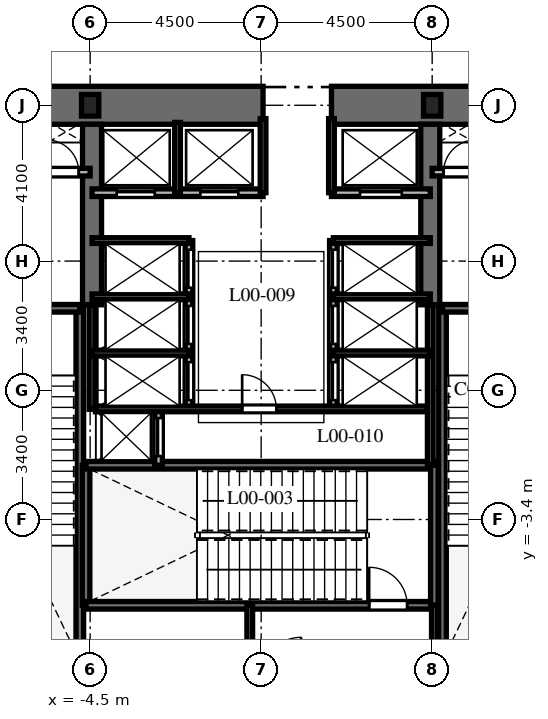
"""IFC4 building model, lengths in metres.
Left out: names, types, materials, properties, quantities, classifications, styles, units other than length and angle.
Written with IfcOpenShell. Run it as: python <this file> out.ifc"""

import sys

from ifc_helpers import new_model, si_unit, direction, frame, frame_2d, origin, origin_2d, place, context, subcontext, project, spatial, rectangle, i_section, extrude, element, fill, save


model = new_model("IFC4")
c1 = context("Model", 3, precision=1e-05, world=origin(), true_north=direction((0.0, 1.0)))
c2 = subcontext(c1, "Body", "Model", "MODEL_VIEW")
j1 = project(units=[si_unit("LENGTHUNIT", "METRE"), si_unit("PLANEANGLEUNIT", "RADIAN")], contexts=[c1])
p1 = place(None, origin())
s1 = spatial("IfcSite", under=j1, at=p1, CompositionType="ELEMENT")
p2 = place(p1, origin())
s2 = spatial("IfcBuilding", under=s1, at=p2, CompositionType="ELEMENT")
p3 = place(p2, origin())
s3 = spatial("IfcBuildingStorey", under=s2, at=p3, CompositionType="ELEMENT", Elevation=0.0)
p4 = place(p3, frame((-9.5, 7.5, 0.0), z_axis=(0.0, 0.0, 1.0), x_axis=(1.0, 0.0, 0.0)))
e1 = element("IfcWall", 1, at=p4, inside=s3, PredefinedType="SHEAR", context=c2, shape_type="SweptSolid", body=[
    extrude(rectangle(XDim=9.55, YDim=1.0, at=frame_2d((4.775, 0.0))), origin(), (0.0, 0.0, 1.0), 6.0),
])
p5 = place(p3, frame((1.85, 7.5, 0.0), z_axis=(0.0, 0.0, 1.0), x_axis=(1.0, 0.0, 0.0)))
e2 = element("IfcWall", 2, at=p5, inside=s3, PredefinedType="SHEAR", context=c2, shape_type="SweptSolid", body=[
    extrude(rectangle(XDim=7.65, YDim=1.0, at=frame_2d((3.825, 0.0))), origin(), (0.0, 0.0, 1.0), 6.0),
])
for number, where, z_axis, x_axis in (
    (3, (-4.45, 2.25, 0.0), (0.0, 0.0, 1.0), (0.0, 1.0, 0.0)),
    (4, (4.45, 2.25, 0.0), (0.0, 0.0, 1.0), (0.0, 1.0, 0.0)),
):
    element("IfcWall", number, at=place(p3, frame(where, z_axis=z_axis, x_axis=x_axis)), inside=s3, PredefinedType="SHEAR", context=c2, shape_type="SweptSolid", body=[
        extrude(rectangle(XDim=4.75, YDim=0.5, at=frame_2d((2.375, 0.0))), origin(), (0.0, 0.0, 1.0), 6.0),
    ])
p6 = place(p3, frame((-4.772, -6.985, 0.0), z_axis=(0.0, 0.0, 1.0), x_axis=(0.0, 1.0, 0.0)))
e5 = element("IfcWall", 5, at=p6, inside=s3, PredefinedType="SHEAR", context=c2, shape_type="SweptSolid", body=[
    extrude(rectangle(XDim=9.143, YDim=0.2, at=frame_2d((4.572, 0.0))), origin(), (0.0, 0.0, 1.0), 6.0),
])
p7 = place(p3, frame((-8.458, 2.158, 0.0), z_axis=(0.0, 0.0, 1.0), x_axis=(1.0, 0.0, 0.0)))
e6 = element("IfcWall", 6, at=p7, inside=s3, PredefinedType="SHEAR", context=c2, shape_type="SweptSolid", body=[
    extrude(rectangle(XDim=3.686, YDim=0.2, at=frame_2d((1.843, 0.0))), origin(), (0.0, 0.0, 1.0), 6.0),
])
p8 = place(p7, frame((1.3, 0.0, 0.0)))
e7 = element("IfcOpeningElement", 7, at=p8, cuts=e6, PredefinedType="OPENING", context=c2, shape_type="SweptSolid", body=[
    extrude(rectangle(XDim=1.0, YDim=2.15, at=frame_2d((0.5, 1.075))), frame((0.0, 0.11, 0.0), z_axis=(0.0, -1.0, 0.0), x_axis=(1.0, 0.0, 0.0)), (0.0, 0.0, 1.0), 0.22),
])
p9 = place(p3, frame((4.772, -6.985, 0.0), z_axis=(0.0, 0.0, 1.0), x_axis=(0.0, 1.0, 0.0)))
e8 = element("IfcWall", 8, at=p9, inside=s3, PredefinedType="SHEAR", context=c2, shape_type="SweptSolid", body=[
    extrude(rectangle(XDim=9.143, YDim=0.2, at=frame_2d((4.572, 0.0))), origin(), (0.0, 0.0, 1.0), 6.0),
])
p10 = place(p3, frame((4.772, 2.158, 0.0), z_axis=(0.0, 0.0, 1.0), x_axis=(1.0, 0.0, 0.0)))
e9 = element("IfcWall", 9, at=p10, inside=s3, PredefinedType="SHEAR", context=c2, shape_type="SweptSolid", body=[
    extrude(rectangle(XDim=3.686, YDim=0.2, at=frame_2d((1.843, 0.0))), origin(), (0.0, 0.0, 1.0), 6.0),
])
p11 = place(p10, frame((1.35, 0.0, 0.0)))
e10 = element("IfcOpeningElement", 10, at=p11, cuts=e9, PredefinedType="OPENING", context=c2, shape_type="SweptSolid", body=[
    extrude(rectangle(XDim=1.0, YDim=2.15, at=frame_2d((0.5, 1.075))), frame((0.0, 0.11, 0.0), z_axis=(0.0, -1.0, 0.0), x_axis=(1.0, 0.0, 0.0)), (0.0, 0.0, 1.0), 0.22),
])
p12 = place(p3, frame((-4.608, -5.658, 0.0), z_axis=(0.0, 0.0, 1.0), x_axis=(0.0, 1.0, 0.0)))
e11 = element("IfcWall", 11, at=p12, inside=s3, PredefinedType="SHEAR", context=c2, shape_type="SweptSolid", body=[
    extrude(rectangle(XDim=3.686, YDim=0.2, at=frame_2d((1.843, 0.0))), origin(), (0.0, 0.0, 1.0), 6.0),
])
p13 = place(p3, frame((-4.608, -5.658, 0.0), z_axis=(0.0, 0.0, 1.0), x_axis=(1.0, 0.0, 0.0)))
e12 = element("IfcWall", 12, at=p13, inside=s3, PredefinedType="SHEAR", context=c2, shape_type="SweptSolid", body=[
    extrude(rectangle(XDim=9.166, YDim=0.2, at=frame_2d((4.583, 0.0))), origin(), (0.0, 0.0, 1.0), 6.0),
])
p14 = place(p13, frame((7.45, 0.0, 0.0)))
e13 = element("IfcOpeningElement", 13, at=p14, cuts=e12, PredefinedType="OPENING", context=c2, shape_type="SweptSolid", body=[
    extrude(rectangle(XDim=1.0, YDim=2.15, at=frame_2d((0.5, 1.075))), frame((0.0, 0.11, 0.0), z_axis=(0.0, -1.0, 0.0), x_axis=(1.0, 0.0, 0.0)), (0.0, 0.0, 1.0), 0.22),
])
p15 = place(p3, frame((-4.608, -1.972, 0.0), z_axis=(0.0, 0.0, 1.0), x_axis=(1.0, 0.0, 0.0)))
e14 = element("IfcWall", 14, at=p15, inside=s3, PredefinedType="SHEAR", context=c2, shape_type="SweptSolid", body=[
    extrude(rectangle(XDim=9.166, YDim=0.2, at=frame_2d((4.583, 0.0))), origin(), (0.0, 0.0, 1.0), 6.0),
])
p16 = place(p3, frame((4.558, -5.658, 0.0), z_axis=(0.0, 0.0, 1.0), x_axis=(0.0, 1.0, 0.0)))
e15 = element("IfcWall", 15, at=p16, inside=s3, PredefinedType="SHEAR", context=c2, shape_type="SweptSolid", body=[
    extrude(rectangle(XDim=3.686, YDim=0.2, at=frame_2d((1.843, 0.0))), origin(), (0.0, 0.0, 1.0), 6.0),
])
for number, where, z_axis, x_axis in (
    (16, (4.5, 7.5, 0.0), (0.0, 0.0, 1.0), (1.0, 0.0, 0.0)),
    (17, (-4.5, 7.5, 0.0), (0.0, 0.0, 1.0), (1.0, 0.0, 0.0)),
):
    element("IfcColumn", number, at=place(p3, frame(where, z_axis=z_axis, x_axis=x_axis)), inside=s3, PredefinedType="COLUMN", context=c2, shape_type="SweptSolid", body=[
        extrude(i_section(OverallWidth=0.454, OverallDepth=0.569, WebThickness=0.078, FlangeThickness=0.125, at=origin_2d()), origin(), (0.0, 0.0, 1.0), 6.0),
    ])
for number, where, z_axis, x_axis in (
    (18, (-0.3, -7.02, 0.0), (0.0, 0.0, 1.0), (0.0, 1.0, 0.0)),
    (19, (4.558, -7.02, 0.0), (0.0, 0.0, 1.0), (0.0, 1.0, 0.0)),
):
    element("IfcWall", number, at=place(p3, frame(where, z_axis=z_axis, x_axis=x_axis)), inside=s3, PredefinedType="PARTITIONING", context=c2, shape_type="SweptSolid", body=[
        extrude(rectangle(XDim=1.362, YDim=0.15, at=frame_2d((0.681, 0.0))), origin(), (0.0, 0.0, 1.0), 5.68),
    ])
p17 = place(p3, frame((-8.55, 5.74, 0.0), z_axis=(0.0, 0.0, 1.0), x_axis=(1.0, 0.0, 0.0)))
e20 = element("IfcWall", 20, at=p17, inside=s3, PredefinedType="PARTITIONING", context=c2, shape_type="SweptSolid", body=[
    extrude(rectangle(XDim=4.05, YDim=0.2, at=frame_2d((2.025, 0.0))), origin(), (0.0, 0.0, 1.0), 5.68),
])
p18 = place(p17, frame((0.75, 0.0, 0.0)))
e21 = element("IfcOpeningElement", 21, at=p18, cuts=e20, PredefinedType="OPENING", context=c2, shape_type="SweptSolid", body=[
    extrude(rectangle(XDim=1.1, YDim=2.2, at=frame_2d((0.55, 1.1))), frame((0.0, 0.11, 0.0), z_axis=(0.0, -1.0, 0.0), x_axis=(1.0, 0.0, 0.0)), (0.0, 0.0, 1.0), 0.22),
])
p19 = place(p17, frame((2.9, 0.0, 0.0)))
e22 = element("IfcOpeningElement", 22, at=p19, cuts=e20, PredefinedType="OPENING", context=c2, shape_type="SweptSolid", body=[
    extrude(rectangle(XDim=0.85, YDim=2.03, at=frame_2d((0.425, 1.015))), frame((0.0, 0.11, 0.0), z_axis=(0.0, -1.0, 0.0), x_axis=(1.0, 0.0, 0.0)), (0.0, 0.0, 1.0), 0.22),
])
p20 = place(p3, frame((4.5, 5.74, 0.0), z_axis=(0.0, 0.0, 1.0), x_axis=(1.0, 0.0, 0.0)))
e23 = element("IfcWall", 23, at=p20, inside=s3, PredefinedType="PARTITIONING", context=c2, shape_type="SweptSolid", body=[
    extrude(rectangle(XDim=4.05, YDim=0.2, at=frame_2d((2.025, 0.0))), origin(), (0.0, 0.0, 1.0), 5.68),
])
p21 = place(p20, frame((0.3, 0.0, 0.0)))
e24 = element("IfcOpeningElement", 24, at=p21, cuts=e23, PredefinedType="OPENING", context=c2, shape_type="SweptSolid", body=[
    extrude(rectangle(XDim=0.85, YDim=2.03, at=frame_2d((0.425, 1.015))), frame((0.0, 0.11, 0.0), z_axis=(0.0, -1.0, 0.0), x_axis=(1.0, 0.0, 0.0)), (0.0, 0.0, 1.0), 0.22),
])
p22 = place(p20, frame((2.15, 0.0, 0.0)))
e25 = element("IfcOpeningElement", 25, at=p22, cuts=e23, PredefinedType="OPENING", context=c2, shape_type="SweptSolid", body=[
    extrude(rectangle(XDim=1.1, YDim=2.2, at=frame_2d((0.55, 1.1))), frame((0.0, 0.11, 0.0), z_axis=(0.0, -1.0, 0.0), x_axis=(1.0, 0.0, 0.0)), (0.0, 0.0, 1.0), 0.22),
])
p23 = place(p3, frame((-2.7, -1.972, 0.0), z_axis=(0.0, 0.0, 1.0), x_axis=(0.0, 1.0, 0.0)))
e26 = element("IfcWall", 26, at=p23, inside=s3, PredefinedType="PARTITIONING", context=c2, shape_type="SweptSolid", body=[
    extrude(rectangle(XDim=1.472, YDim=0.2, at=frame_2d((0.736, 0.0))), origin(), (0.0, 0.0, 1.0), 5.68),
])
p24 = place(p23, frame((0.24, 0.0, 0.0)))
e27 = element("IfcOpeningElement", 27, at=p24, cuts=e26, PredefinedType="OPENING", context=c2, shape_type="SweptSolid", body=[
    extrude(rectangle(XDim=1.0, YDim=2.2, at=frame_2d((0.5, 1.1))), frame((0.0, 0.11, 0.0), z_axis=(0.0, -1.0, 0.0), x_axis=(1.0, 0.0, 0.0)), (0.0, 0.0, 1.0), 0.22),
])
p25 = place(p3, frame((-4.45, 5.2, 0.0), z_axis=(0.0, 0.0, 1.0), x_axis=(1.0, 0.0, 0.0)))
e28 = element("IfcWall", 28, at=p25, inside=s3, PredefinedType="PARTITIONING", context=c2, shape_type="SweptSolid", body=[
    extrude(rectangle(XDim=4.5, YDim=0.2, at=frame_2d((2.25, 0.0))), origin(), (0.0, 0.0, 1.0), 5.68),
])
p26 = place(p25, frame((0.65, 0.0, 0.0)))
e29 = element("IfcOpeningElement", 29, at=p26, cuts=e28, PredefinedType="OPENING", context=c2, shape_type="SweptSolid", body=[
    extrude(rectangle(XDim=1.0, YDim=2.2, at=frame_2d((0.5, 1.1))), frame((0.0, 0.11, 0.0), z_axis=(0.0, -1.0, 0.0), x_axis=(1.0, 0.0, 0.0)), (0.0, 0.0, 1.0), 0.22),
])
p27 = place(p25, frame((2.85, 0.0, 0.0)))
e30 = element("IfcOpeningElement", 30, at=p27, cuts=e28, PredefinedType="OPENING", context=c2, shape_type="SweptSolid", body=[
    extrude(rectangle(XDim=1.0, YDim=2.2, at=frame_2d((0.5, 1.1))), frame((0.0, 0.11, 0.0), z_axis=(0.0, -1.0, 0.0), x_axis=(1.0, 0.0, 0.0)), (0.0, 0.0, 1.0), 0.22),
])
p28 = place(p3, frame((1.85, 5.2, 0.0), z_axis=(0.0, 0.0, 1.0), x_axis=(1.0, 0.0, 0.0)))
e31 = element("IfcWall", 31, at=p28, inside=s3, PredefinedType="PARTITIONING", context=c2, shape_type="SweptSolid", body=[
    extrude(rectangle(XDim=2.6, YDim=0.2, at=frame_2d((1.3, 0.0))), origin(), (0.0, 0.0, 1.0), 5.68),
])
p29 = place(p28, frame((0.75, 0.0, 0.0)))
e32 = element("IfcOpeningElement", 32, at=p29, cuts=e31, PredefinedType="OPENING", context=c2, shape_type="SweptSolid", body=[
    extrude(rectangle(XDim=1.1, YDim=2.2, at=frame_2d((0.55, 1.1))), frame((0.0, 0.11, 0.0), z_axis=(0.0, -1.0, 0.0), x_axis=(1.0, 0.0, 0.0)), (0.0, 0.0, 1.0), 0.22),
])
p30 = place(p3, frame((-2.2, 5.2, 0.0), z_axis=(0.0, 0.0, 1.0), x_axis=(0.0, 1.0, 0.0)))
e33 = element("IfcWall", 33, at=p30, inside=s3, PredefinedType="PARTITIONING", context=c2, shape_type="SweptSolid", body=[
    extrude(rectangle(XDim=1.85, YDim=0.15, at=frame_2d((0.925, 0.0))), origin(), (0.0, 0.0, 1.0), 5.68),
])
for number, where, z_axis, x_axis in (
    (34, (0.05, 5.2, 0.0), (0.0, 0.0, 1.0), (0.0, 1.0, 0.0)),
    (35, (1.85, 5.2, 0.0), (0.0, 0.0, 1.0), (0.0, 1.0, 0.0)),
):
    element("IfcWall", number, at=place(p3, frame(where, z_axis=z_axis, x_axis=x_axis)), inside=s3, PredefinedType="PARTITIONING", context=c2, shape_type="SweptSolid", body=[
        extrude(rectangle(XDim=1.95, YDim=0.15, at=frame_2d((0.975, 0.0))), origin(), (0.0, 0.0, 1.0), 5.68),
    ])
p31 = place(p3, frame((-4.45, -0.5, 0.0), z_axis=(0.0, 0.0, 1.0), x_axis=(0.0, 1.0, 0.0)))
e36 = element("IfcWall", 36, at=p31, inside=s3, PredefinedType="PARTITIONING", context=c2, shape_type="SweptSolid", body=[
    extrude(rectangle(XDim=2.75, YDim=0.15, at=frame_2d((1.375, 0.0))), origin(), (0.0, 0.0, 1.0), 5.68),
])
p32 = place(p3, frame((4.45, -1.972, 0.0), z_axis=(0.0, 0.0, 1.0), x_axis=(0.0, 1.0, 0.0)))
e37 = element("IfcWall", 37, at=p32, inside=s3, PredefinedType="PARTITIONING", context=c2, shape_type="SweptSolid", body=[
    extrude(rectangle(XDim=4.222, YDim=0.15, at=frame_2d((2.111, 0.0))), origin(), (0.0, 0.0, 1.0), 5.68),
])
p33 = place(p3, frame((-1.9, -0.5, 0.0), z_axis=(0.0, 0.0, 1.0), x_axis=(0.0, 1.0, 0.0)))
e38 = element("IfcWall", 38, at=p33, inside=s3, PredefinedType="PARTITIONING", context=c2, shape_type="SweptSolid", body=[
    extrude(rectangle(XDim=4.44, YDim=0.2, at=frame_2d((2.22, 0.0))), origin(), (0.0, 0.0, 1.0), 5.68),
])
p34 = place(p33, frame((0.24, 0.0, 0.0)))
e39 = element("IfcOpeningElement", 39, at=p34, cuts=e38, PredefinedType="OPENING", context=c2, shape_type="SweptSolid", body=[
    extrude(rectangle(XDim=1.0, YDim=2.2, at=frame_2d((0.5, 1.1))), frame((0.0, 0.11, 0.0), z_axis=(0.0, -1.0, 0.0), x_axis=(1.0, 0.0, 0.0)), (0.0, 0.0, 1.0), 0.22),
])
p35 = place(p33, frame((1.72, 0.0, 0.0)))
e40 = element("IfcOpeningElement", 40, at=p35, cuts=e38, PredefinedType="OPENING", context=c2, shape_type="SweptSolid", body=[
    extrude(rectangle(XDim=1.0, YDim=2.2, at=frame_2d((0.5, 1.1))), frame((0.0, 0.11, 0.0), z_axis=(0.0, -1.0, 0.0), x_axis=(1.0, 0.0, 0.0)), (0.0, 0.0, 1.0), 0.22),
])
p36 = place(p33, frame((3.2, 0.0, 0.0)))
e41 = element("IfcOpeningElement", 41, at=p36, cuts=e38, PredefinedType="OPENING", context=c2, shape_type="SweptSolid", body=[
    extrude(rectangle(XDim=1.0, YDim=2.2, at=frame_2d((0.5, 1.1))), frame((0.0, 0.11, 0.0), z_axis=(0.0, -1.0, 0.0), x_axis=(1.0, 0.0, 0.0)), (0.0, 0.0, 1.0), 0.22),
])
for number, where, z_axis, x_axis in (
    (42, (-4.45, 3.94, 0.0), (0.0, 0.0, 1.0), (1.0, 0.0, 0.0)),
    (43, (-4.45, 0.98, 0.0), (0.0, 0.0, 1.0), (1.0, 0.0, 0.0)),
    (44, (-4.45, 2.46, 0.0), (0.0, 0.0, 1.0), (1.0, 0.0, 0.0)),
):
    element("IfcWall", number, at=place(p3, frame(where, z_axis=z_axis, x_axis=x_axis)), inside=s3, PredefinedType="PARTITIONING", context=c2, shape_type="SweptSolid", body=[
        extrude(rectangle(XDim=2.55, YDim=0.15, at=frame_2d((1.275, 0.0))), origin(), (0.0, 0.0, 1.0), 5.68),
    ])
p37 = place(p3, frame((1.9, -0.5, 0.0), z_axis=(0.0, 0.0, 1.0), x_axis=(0.0, 1.0, 0.0)))
e45 = element("IfcWall", 45, at=p37, inside=s3, PredefinedType="PARTITIONING", context=c2, shape_type="SweptSolid", body=[
    extrude(rectangle(XDim=4.44, YDim=0.2, at=frame_2d((2.22, 0.0))), origin(), (0.0, 0.0, 1.0), 5.68),
])
p38 = place(p37, frame((0.24, 0.0, 0.0)))
e46 = element("IfcOpeningElement", 46, at=p38, cuts=e45, PredefinedType="OPENING", context=c2, shape_type="SweptSolid", body=[
    extrude(rectangle(XDim=1.0, YDim=2.2, at=frame_2d((0.5, 1.1))), frame((0.0, 0.11, 0.0), z_axis=(0.0, -1.0, 0.0), x_axis=(1.0, 0.0, 0.0)), (0.0, 0.0, 1.0), 0.22),
])
p39 = place(p37, frame((1.72, 0.0, 0.0)))
e47 = element("IfcOpeningElement", 47, at=p39, cuts=e45, PredefinedType="OPENING", context=c2, shape_type="SweptSolid", body=[
    extrude(rectangle(XDim=1.0, YDim=2.2, at=frame_2d((0.5, 1.1))), frame((0.0, 0.11, 0.0), z_axis=(0.0, -1.0, 0.0), x_axis=(1.0, 0.0, 0.0)), (0.0, 0.0, 1.0), 0.22),
])
p40 = place(p37, frame((3.2, 0.0, 0.0)))
e48 = element("IfcOpeningElement", 48, at=p40, cuts=e45, PredefinedType="OPENING", context=c2, shape_type="SweptSolid", body=[
    extrude(rectangle(XDim=1.0, YDim=2.2, at=frame_2d((0.5, 1.1))), frame((0.0, 0.11, 0.0), z_axis=(0.0, -1.0, 0.0), x_axis=(1.0, 0.0, 0.0)), (0.0, 0.0, 1.0), 0.22),
])
for number, where, z_axis, x_axis in (
    (49, (1.9, 3.94, 0.0), (0.0, 0.0, 1.0), (1.0, 0.0, 0.0)),
    (50, (1.9, 0.98, 0.0), (0.0, 0.0, 1.0), (1.0, 0.0, 0.0)),
    (51, (1.9, 2.46, 0.0), (0.0, 0.0, 1.0), (1.0, 0.0, 0.0)),
):
    element("IfcWall", number, at=place(p3, frame(where, z_axis=z_axis, x_axis=x_axis)), inside=s3, PredefinedType="PARTITIONING", context=c2, shape_type="SweptSolid", body=[
        extrude(rectangle(XDim=2.55, YDim=0.15, at=frame_2d((1.275, 0.0))), origin(), (0.0, 0.0, 1.0), 5.68),
    ])
p41 = place(p3, frame((-4.36, -0.49, 0.0), z_axis=(0.0, 0.0, 1.0), x_axis=(1.0, 0.0, 0.0)))
e52 = element("IfcWall", 52, at=p41, inside=s3, PredefinedType="PARTITIONING", context=c2, shape_type="SweptSolid", body=[
    extrude(rectangle(XDim=8.72, YDim=0.15, at=frame_2d((4.36, 0.0))), origin(), (0.0, 0.0, 1.0), 5.68),
])
p42 = place(p41, frame((3.86, 0.0, 0.0)))
e53 = element("IfcOpeningElement", 53, at=p42, cuts=e52, PredefinedType="OPENING", context=c2, shape_type="SweptSolid", body=[
    extrude(rectangle(XDim=0.9, YDim=2.03, at=frame_2d((0.45, 1.015))), frame((0.0, 0.085, 0.0), z_axis=(0.0, -1.0, 0.0), x_axis=(1.0, 0.0, 0.0)), (0.0, 0.0, 1.0), 0.17),
])
p43 = place(p14, origin())
e54 = element("IfcDoor", 54, at=p43, inside=s3, OperationType="SINGLE_SWING_LEFT", PredefinedType="DOOR", context=c2, shape_type="SweptSolid", body=[
    extrude(rectangle(XDim=1.0, YDim=2.15, at=frame_2d((0.5, 1.075))), frame((0.0, 0.025, 0.0), z_axis=(0.0, -1.0, 0.0), x_axis=(1.0, 0.0, 0.0)), (0.0, 0.0, 1.0), 0.05),
])
fill(e13, e54)
p44 = place(p19, origin())
e55 = element("IfcDoor", 55, at=p44, inside=s3, OperationType="SINGLE_SWING_LEFT", PredefinedType="DOOR", context=c2, shape_type="SweptSolid", body=[
    extrude(rectangle(XDim=0.85, YDim=2.03, at=frame_2d((0.425, 1.015))), frame((0.0, 0.025, 0.0), z_axis=(0.0, -1.0, 0.0), x_axis=(1.0, 0.0, 0.0)), (0.0, 0.0, 1.0), 0.05),
])
fill(e22, e55)
p45 = place(p21, origin())
e56 = element("IfcDoor", 56, at=p45, inside=s3, OperationType="SINGLE_SWING_RIGHT", PredefinedType="DOOR", context=c2, shape_type="SweptSolid", body=[
    extrude(rectangle(XDim=0.85, YDim=2.03, at=frame_2d((0.425, 1.015))), frame((0.0, 0.025, 0.0), z_axis=(0.0, -1.0, 0.0), x_axis=(1.0, 0.0, 0.0)), (0.0, 0.0, 1.0), 0.05),
])
fill(e24, e56)
p46 = place(p24, origin())
e57 = element("IfcDoor", 57, at=p46, inside=s3, OperationType="SLIDING_TO_LEFT", PredefinedType="DOOR", context=c2, shape_type="SweptSolid", body=[
    extrude(rectangle(XDim=1.0, YDim=2.2, at=frame_2d((0.5, 1.1))), frame((0.0, 0.025, 0.0), z_axis=(0.0, -1.0, 0.0), x_axis=(1.0, 0.0, 0.0)), (0.0, 0.0, 1.0), 0.05),
])
fill(e27, e57)
p47 = place(p26, origin())
e58 = element("IfcDoor", 58, at=p47, inside=s3, OperationType="SLIDING_TO_LEFT", PredefinedType="DOOR", context=c2, shape_type="SweptSolid", body=[
    extrude(rectangle(XDim=1.0, YDim=2.2, at=frame_2d((0.5, 1.1))), frame((0.0, 0.025, 0.0), z_axis=(0.0, -1.0, 0.0), x_axis=(1.0, 0.0, 0.0)), (0.0, 0.0, 1.0), 0.05),
])
fill(e29, e58)
p48 = place(p27, origin())
e59 = element("IfcDoor", 59, at=p48, inside=s3, OperationType="SLIDING_TO_RIGHT", PredefinedType="DOOR", context=c2, shape_type="SweptSolid", body=[
    extrude(rectangle(XDim=1.0, YDim=2.2, at=frame_2d((0.5, 1.1))), frame((0.0, 0.025, 0.0), z_axis=(0.0, -1.0, 0.0), x_axis=(1.0, 0.0, 0.0)), (0.0, 0.0, 1.0), 0.05),
])
fill(e30, e59)
p49 = place(p29, origin())
e60 = element("IfcDoor", 60, at=p49, inside=s3, OperationType="SLIDING_TO_RIGHT", PredefinedType="DOOR", context=c2, shape_type="SweptSolid", body=[
    extrude(rectangle(XDim=1.1, YDim=2.2, at=frame_2d((0.55, 1.1))), frame((0.0, 0.025, 0.0), z_axis=(0.0, -1.0, 0.0), x_axis=(1.0, 0.0, 0.0)), (0.0, 0.0, 1.0), 0.05),
])
fill(e32, e60)
p50 = place(p34, origin())
e61 = element("IfcDoor", 61, at=p50, inside=s3, OperationType="SLIDING_TO_LEFT", PredefinedType="DOOR", context=c2, shape_type="SweptSolid", body=[
    extrude(rectangle(XDim=1.0, YDim=2.2, at=frame_2d((0.5, 1.1))), frame((0.0, 0.025, 0.0), z_axis=(0.0, -1.0, 0.0), x_axis=(1.0, 0.0, 0.0)), (0.0, 0.0, 1.0), 0.05),
])
fill(e39, e61)
p51 = place(p35, origin())
e62 = element("IfcDoor", 62, at=p51, inside=s3, OperationType="SLIDING_TO_LEFT", PredefinedType="DOOR", context=c2, shape_type="SweptSolid", body=[
    extrude(rectangle(XDim=1.0, YDim=2.2, at=frame_2d((0.5, 1.1))), frame((0.0, 0.025, 0.0), z_axis=(0.0, -1.0, 0.0), x_axis=(1.0, 0.0, 0.0)), (0.0, 0.0, 1.0), 0.05),
])
fill(e40, e62)
p52 = place(p36, origin())
e63 = element("IfcDoor", 63, at=p52, inside=s3, OperationType="SLIDING_TO_LEFT", PredefinedType="DOOR", context=c2, shape_type="SweptSolid", body=[
    extrude(rectangle(XDim=1.0, YDim=2.2, at=frame_2d((0.5, 1.1))), frame((0.0, 0.025, 0.0), z_axis=(0.0, -1.0, 0.0), x_axis=(1.0, 0.0, 0.0)), (0.0, 0.0, 1.0), 0.05),
])
fill(e41, e63)
p53 = place(p38, origin())
e64 = element("IfcDoor", 64, at=p53, inside=s3, OperationType="SLIDING_TO_RIGHT", PredefinedType="DOOR", context=c2, shape_type="SweptSolid", body=[
    extrude(rectangle(XDim=1.0, YDim=2.2, at=frame_2d((0.5, 1.1))), frame((0.0, 0.025, 0.0), z_axis=(0.0, -1.0, 0.0), x_axis=(1.0, 0.0, 0.0)), (0.0, 0.0, 1.0), 0.05),
])
fill(e46, e64)
p54 = place(p39, origin())
e65 = element("IfcDoor", 65, at=p54, inside=s3, OperationType="SLIDING_TO_RIGHT", PredefinedType="DOOR", context=c2, shape_type="SweptSolid", body=[
    extrude(rectangle(XDim=1.0, YDim=2.2, at=frame_2d((0.5, 1.1))), frame((0.0, 0.025, 0.0), z_axis=(0.0, -1.0, 0.0), x_axis=(1.0, 0.0, 0.0)), (0.0, 0.0, 1.0), 0.05),
])
fill(e47, e65)
p55 = place(p40, origin())
e66 = element("IfcDoor", 66, at=p55, inside=s3, OperationType="SLIDING_TO_RIGHT", PredefinedType="DOOR", context=c2, shape_type="SweptSolid", body=[
    extrude(rectangle(XDim=1.0, YDim=2.2, at=frame_2d((0.5, 1.1))), frame((0.0, 0.025, 0.0), z_axis=(0.0, -1.0, 0.0), x_axis=(1.0, 0.0, 0.0)), (0.0, 0.0, 1.0), 0.05),
])
fill(e48, e66)
p56 = place(p42, origin())
e67 = element("IfcDoor", 67, at=p56, inside=s3, OperationType="SINGLE_SWING_LEFT", PredefinedType="DOOR", context=c2, shape_type="SweptSolid", body=[
    extrude(rectangle(XDim=0.9, YDim=2.03, at=frame_2d((0.45, 1.015))), frame((0.0, 0.025, 0.0), z_axis=(0.0, -1.0, 0.0), x_axis=(1.0, 0.0, 0.0)), (0.0, 0.0, 1.0), 0.05),
])
fill(e53, e67)
save(model, sys.argv[1])
